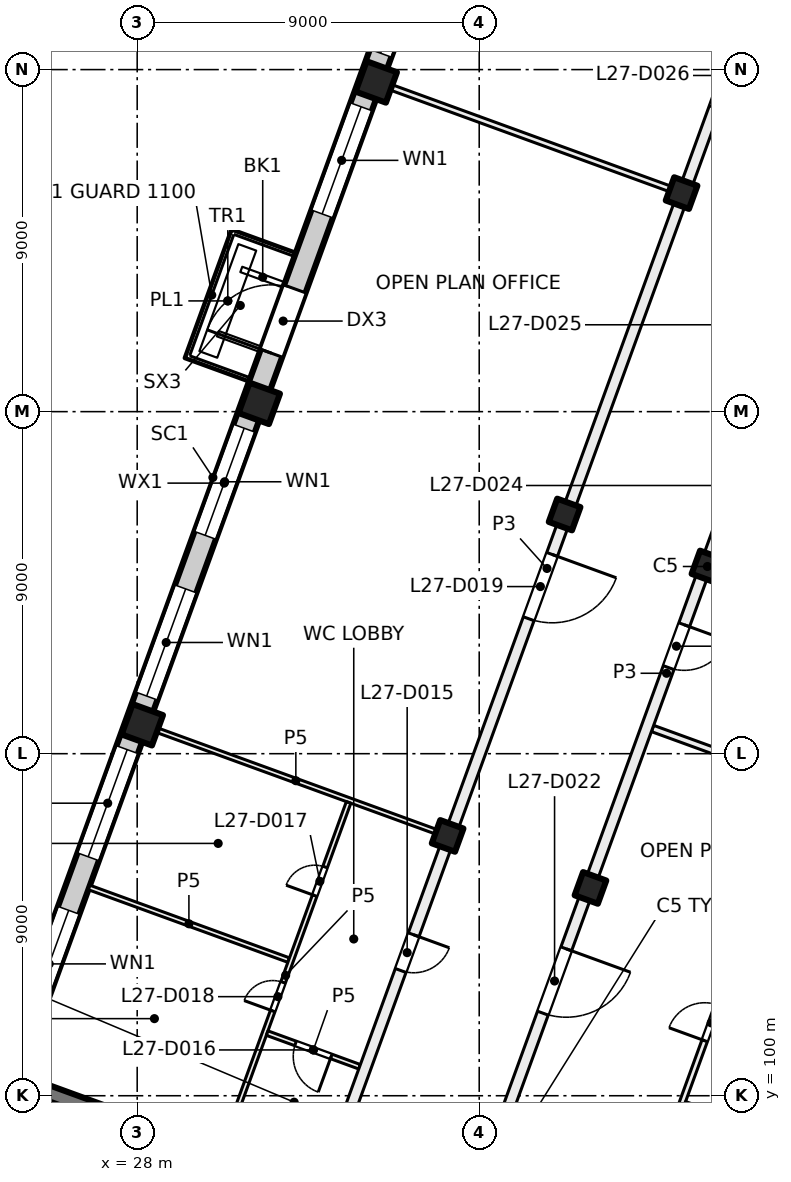
"""IFC4 building model, lengths in metres.
Left out: names, types, materials, properties, quantities, classifications, styles, units other than length and angle.
Written with IfcOpenShell. Run it as: python <this file> out.ifc"""

import sys

from ifc_helpers import new_model, si_unit, direction, frame, frame_2d, origin, origin_2d, place, context, subcontext, project, spatial, rectangle, extrude, element, fill, save


model = new_model("IFC4")
c1 = context("Model", 3, precision=1e-05, world=origin(), true_north=direction((0.0, 1.0)))
c2 = subcontext(c1, "Body", "Model", "MODEL_VIEW")
j1 = project(units=[si_unit("LENGTHUNIT", "METRE"), si_unit("PLANEANGLEUNIT", "RADIAN")], contexts=[c1])
p1 = place(None, origin())
s1 = spatial("IfcSite", under=j1, at=p1, CompositionType="ELEMENT")
p2 = place(p1, origin())
s2 = spatial("IfcBuilding", under=s1, at=p2, CompositionType="ELEMENT")
p3 = place(p2, frame((0.0, 0.0, 117.0)))
s3 = spatial("IfcBuildingStorey", under=s2, at=p3, CompositionType="ELEMENT", Elevation=117.0)
for number, where, z_axis, x_axis in (
    (1, (43.006, 113.925, 0.0), (0.0, 0.0, 1.0), (-0.342, -0.94, 0.0)),
    (2, (39.927, 105.468, 0.0), (0.0, 0.0, 1.0), (-0.342, -0.94, 0.0)),
    (3, (42.325, 123.751, 0.0), (0.0, 0.0, 1.0), (-0.342, -0.94, 0.0)),
    (4, (39.247, 115.293, 0.0), (0.0, 0.0, 1.0), (-0.342, -0.94, 0.0)),
    (5, (36.169, 106.836, 0.0), (0.0, 0.0, 1.0), (-0.342, -0.94, 0.0)),
):
    element("IfcColumn", number, at=place(p3, frame(where, z_axis=z_axis, x_axis=x_axis)), inside=s3, PredefinedType="COLUMN", context=c2, shape_type="SweptSolid", body=[
        extrude(rectangle(XDim=0.65, YDim=0.65, at=origin_2d()), origin(), (0.0, 0.0, 1.0), 4.0),
    ])
for number, where, z_axis, x_axis in (
    (6, (34.291, 126.675, 0.0), (0.0, 0.0, 1.0), (-0.342, -0.94, 0.0)),
    (7, (31.212, 118.218, 0.0), (0.0, 0.0, 1.0), (-0.342, -0.94, 0.0)),
    (8, (28.134, 109.76, 0.0), (0.0, 0.0, 1.0), (-0.342, -0.94, 0.0)),
):
    element("IfcColumn", number, at=place(p3, frame(where, z_axis=z_axis, x_axis=x_axis)), inside=s3, PredefinedType="COLUMN", context=c2, shape_type="SweptSolid", body=[
        extrude(rectangle(XDim=0.85, YDim=0.85, at=origin_2d()), origin(), (0.0, 0.0, 1.0), 4.0),
    ])
p4 = place(p3, frame((32.953, 97.418, 0.0), z_axis=(0.0, 0.0, 1.0), x_axis=(-0.93969060187, 0.342025690201, 0.0)))
e9 = element("IfcWall", 9, at=p4, inside=s3, PredefinedType="SHEAR", context=c2, shape_type="SweptSolid", body=[
    extrude(rectangle(XDim=8.6, YDim=0.4, at=frame_2d((4.3, 0.0))), origin(), (0.0, 0.0, 1.0), 4.0),
])
p5 = place(p3, frame((24.666, 100.669, 0.0), z_axis=(0.0, 0.0, 1.0), x_axis=(0.34201964167, 0.939692803373, 0.0)))
e10 = element("IfcWall", 10, at=p5, inside=s3, PredefinedType="SOLIDWALL", context=c2, shape_type="SweptSolid", body=[
    extrude(rectangle(XDim=32.884, YDim=0.6, at=frame_2d((16.442, 0.0))), origin(), (0.0, 0.0, 1.0), 3.625),
])
p6 = place(p5, frame((1.48, 0.0, 0.9)))
e11 = element("IfcOpeningElement", 11, at=p6, cuts=e10, PredefinedType="OPENING", context=c2, shape_type="SweptSolid", body=[
    extrude(rectangle(XDim=3.0, YDim=2.4, at=frame_2d((1.5, 1.2))), frame((0.0, 0.31, 0.0), z_axis=(0.0, -1.0, 0.0), x_axis=(1.0, 0.0, 0.0)), (0.0, 0.0, 1.0), 0.62),
])
p7 = place(p5, frame((5.98, 0.0, 0.9)))
e12 = element("IfcOpeningElement", 12, at=p7, cuts=e10, PredefinedType="OPENING", context=c2, shape_type="SweptSolid", body=[
    extrude(rectangle(XDim=3.0, YDim=2.4, at=frame_2d((1.5, 1.2))), frame((0.0, 0.31, 0.0), z_axis=(0.0, -1.0, 0.0), x_axis=(1.0, 0.0, 0.0)), (0.0, 0.0, 1.0), 0.62),
])
p8 = place(p5, frame((10.48, 0.0, 0.9)))
e13 = element("IfcOpeningElement", 13, at=p8, cuts=e10, PredefinedType="OPENING", context=c2, shape_type="SweptSolid", body=[
    extrude(rectangle(XDim=3.0, YDim=2.4, at=frame_2d((1.5, 1.2))), frame((0.0, 0.31, 0.0), z_axis=(0.0, -1.0, 0.0), x_axis=(1.0, 0.0, 0.0)), (0.0, 0.0, 1.0), 0.62),
])
p9 = place(p5, frame((14.98, 0.0, 0.9)))
e14 = element("IfcOpeningElement", 14, at=p9, cuts=e10, PredefinedType="OPENING", context=c2, shape_type="SweptSolid", body=[
    extrude(rectangle(XDim=3.0, YDim=2.4, at=frame_2d((1.5, 1.2))), frame((0.0, 0.31, 0.0), z_axis=(0.0, -1.0, 0.0), x_axis=(1.0, 0.0, 0.0)), (0.0, 0.0, 1.0), 0.62),
])
p10 = place(p5, frame((20.08, 0.0, 0.0)))
e15 = element("IfcOpeningElement", 15, at=p10, cuts=e10, PredefinedType="OPENING", context=c2, shape_type="SweptSolid", body=[
    extrude(rectangle(XDim=1.8, YDim=2.4, at=frame_2d((0.9, 1.2))), frame((0.0, 0.31, 0.0), z_axis=(0.0, -1.0, 0.0), x_axis=(1.0, 0.0, 0.0)), (0.0, 0.0, 1.0), 0.62),
])
p11 = place(p5, frame((23.98, 0.0, 0.9)))
e16 = element("IfcOpeningElement", 16, at=p11, cuts=e10, PredefinedType="OPENING", context=c2, shape_type="SweptSolid", body=[
    extrude(rectangle(XDim=3.0, YDim=2.4, at=frame_2d((1.5, 1.2))), frame((0.0, 0.31, 0.0), z_axis=(0.0, -1.0, 0.0), x_axis=(1.0, 0.0, 0.0)), (0.0, 0.0, 1.0), 0.62),
])
p12 = place(p5, frame((28.48, 0.0, 0.9)))
e17 = element("IfcOpeningElement", 17, at=p12, cuts=e10, PredefinedType="OPENING", context=c2, shape_type="SweptSolid", body=[
    extrude(rectangle(XDim=3.0, YDim=2.4, at=frame_2d((1.5, 1.2))), frame((0.0, 0.31, 0.0), z_axis=(0.0, -1.0, 0.0), x_axis=(1.0, 0.0, 0.0)), (0.0, 0.0, 1.0), 0.62),
])
p13 = place(p3, frame((26.736, 105.48, 0.0), z_axis=(0.0, 0.0, 1.0), x_axis=(0.939690035435, -0.342027246436, 0.0)))
e18 = element("IfcWall", 18, at=p13, inside=s3, PredefinedType="PARTITIONING", context=c2, shape_type="SweptSolid", body=[
    extrude(rectangle(XDim=5.587, YDim=0.125, at=frame_2d((2.793, 0.0))), origin(), (0.0, 0.0, 1.0), 3.625),
])
p14 = place(p3, frame((28.275, 109.709, 0.0), z_axis=(0.0, 0.0, 1.0), x_axis=(0.939697205528, -0.342007546586, 0.0)))
e19 = element("IfcWall", 19, at=p14, inside=s3, PredefinedType="PARTITIONING", context=c2, shape_type="SweptSolid", body=[
    extrude(rectangle(XDim=8.301, YDim=0.125, at=frame_2d((4.15, 0.0))), origin(), (0.0, 0.0, 1.0), 3.625),
])
p15 = place(p3, frame((30.25, 98.615, 0.0), z_axis=(0.0, 0.0, 1.0), x_axis=(0.341998018937, 0.93970067311, 0.0)))
e20 = element("IfcWall", 20, at=p15, inside=s3, PredefinedType="PARTITIONING", context=c2, shape_type="SweptSolid", body=[
    extrude(rectangle(XDim=9.687, YDim=0.125, at=frame_2d((4.844, 0.0))), origin(), (0.0, 0.0, 1.0), 3.625),
])
p16 = place(p15, frame((7.078, 0.0, 0.0)))
e21 = element("IfcOpeningElement", 21, at=p16, cuts=e20, PredefinedType="OPENING", context=c2, shape_type="SweptSolid", body=[
    extrude(rectangle(XDim=0.8, YDim=2.1, at=frame_2d((0.4, 1.05))), frame((0.0, 0.073, 0.0), z_axis=(0.0, -1.0, 0.0), x_axis=(1.0, 0.0, 0.0)), (0.0, 0.0, 1.0), 0.145),
])
p17 = place(p15, frame((3.848, 0.0, 0.0)))
e22 = element("IfcOpeningElement", 22, at=p17, cuts=e20, PredefinedType="OPENING", context=c2, shape_type="SweptSolid", body=[
    extrude(rectangle(XDim=0.8, YDim=2.1, at=frame_2d((0.4, 1.05))), frame((0.0, 0.073, 0.0), z_axis=(0.0, -1.0, 0.0), x_axis=(1.0, 0.0, 0.0)), (0.0, 0.0, 1.0), 0.145),
])
p18 = place(p3, frame((33.852, 100.762, 0.0), z_axis=(0.0, 0.0, 1.0), x_axis=(-0.93959774877, 0.342280689649, 0.0)))
e23 = element("IfcWall", 23, at=p18, inside=s3, PredefinedType="PARTITIONING", context=c2, shape_type="SweptSolid", body=[
    extrude(rectangle(XDim=2.588, YDim=0.125, at=frame_2d((1.294, 0.0))), origin(), (0.0, 0.0, 1.0), 3.625),
])
p19 = place(p18, frame((0.794, 0.0, 0.0)))
e24 = element("IfcOpeningElement", 24, at=p19, cuts=e23, PredefinedType="OPENING", context=c2, shape_type="SweptSolid", body=[
    extrude(rectangle(XDim=1.0, YDim=2.1, at=frame_2d((0.5, 1.05))), frame((0.0, 0.073, 0.0), z_axis=(0.0, -1.0, 0.0), x_axis=(1.0, 0.0, 0.0)), (0.0, 0.0, 1.0), 0.145),
])
p20 = place(p3, frame((44.686, 130.091, 0.0), z_axis=(0.0, 0.0, 1.0), x_axis=(-0.342017360004, -0.939693633828, 0.0)))
e25 = element("IfcWall", 25, at=p20, inside=s3, PredefinedType="PARTITIONING", context=c2, shape_type="SweptSolid", body=[
    extrude(rectangle(XDim=34.516, YDim=0.3, at=frame_2d((17.258, 0.0))), origin(), (0.0, 0.0, 1.0), 3.625),
])
p21 = place(p20, frame((27.515, 0.0, 0.0)))
e26 = element("IfcOpeningElement", 26, at=p21, cuts=e25, PredefinedType="OPENING", context=c2, shape_type="SweptSolid", body=[
    extrude(rectangle(XDim=1.0, YDim=2.1, at=frame_2d((0.5, 1.05))), frame((0.0, 0.16, 0.0), z_axis=(0.0, -1.0, 0.0), x_axis=(1.0, 0.0, 0.0)), (0.0, 0.0, 1.0), 0.32),
])
p22 = place(p20, frame((16.865, 0.0, 0.0)))
e27 = element("IfcOpeningElement", 27, at=p22, cuts=e25, PredefinedType="OPENING", context=c2, shape_type="SweptSolid", body=[
    extrude(rectangle(XDim=1.8, YDim=2.1, at=frame_2d((0.9, 1.05))), frame((0.0, 0.16, 0.0), z_axis=(0.0, -1.0, 0.0), x_axis=(1.0, 0.0, 0.0)), (0.0, 0.0, 1.0), 0.32),
])
p23 = place(p20, frame((2.554, 0.0, 0.0)))
e28 = element("IfcOpeningElement", 28, at=p23, cuts=e25, PredefinedType="OPENING", context=c2, shape_type="SweptSolid", body=[
    extrude(rectangle(XDim=1.8, YDim=2.1, at=frame_2d((0.9, 1.05))), frame((0.0, 0.16, 0.0), z_axis=(0.0, -1.0, 0.0), x_axis=(1.0, 0.0, 0.0)), (0.0, 0.0, 1.0), 0.32),
])
p24 = place(p3, frame((40.539, 94.87, 0.0), z_axis=(0.0, 0.0, 1.0), x_axis=(0.342082231415, 0.939670020247, 0.0)))
e29 = element("IfcWall", 29, at=p24, inside=s3, PredefinedType="PARTITIONING", context=c2, shape_type="SweptSolid", body=[
    extrude(rectangle(XDim=9.825, YDim=0.15, at=frame_2d((4.912, 0.0))), origin(), (0.0, 0.0, 1.0), 3.625),
])
p25 = place(p24, frame((2.125, 0.0, 0.0)))
e30 = element("IfcOpeningElement", 30, at=p25, cuts=e29, PredefinedType="OPENING", context=c2, shape_type="SweptSolid", body=[
    extrude(rectangle(XDim=1.0, YDim=2.1, at=frame_2d((0.5, 1.05))), frame((0.0, 0.085, 0.0), z_axis=(0.0, -1.0, 0.0), x_axis=(1.0, 0.0, 0.0)), (0.0, 0.0, 1.0), 0.17),
])
p26 = place(p24, frame((7.0, 0.0, 0.0)))
e31 = element("IfcOpeningElement", 31, at=p26, cuts=e29, PredefinedType="OPENING", context=c2, shape_type="SweptSolid", body=[
    extrude(rectangle(XDim=1.0, YDim=2.1, at=frame_2d((0.5, 1.05))), frame((0.0, 0.085, 0.0), z_axis=(0.0, -1.0, 0.0), x_axis=(1.0, 0.0, 0.0)), (0.0, 0.0, 1.0), 0.17),
])
p27 = place(p3, frame((41.561, 109.663, 0.0), z_axis=(0.0, 0.0, 1.0), x_axis=(0.939673986983, -0.342071334939, 0.0)))
e32 = element("IfcWall", 32, at=p27, inside=s3, PredefinedType="PARTITIONING", context=c2, shape_type="SweptSolid", body=[
    extrude(rectangle(XDim=8.3, YDim=0.175, at=frame_2d((4.15, 0.0))), origin(), (0.0, 0.0, 1.0), 3.625),
])
p28 = place(p3, frame((42.405, 99.777, 0.0), z_axis=(0.0, 0.0, 1.0), x_axis=(0.939765774653, -0.341819087808, 0.0)))
e33 = element("IfcWall", 33, at=p28, inside=s3, PredefinedType="PARTITIONING", context=c2, shape_type="SweptSolid", body=[
    extrude(rectangle(XDim=4.125, YDim=0.15, at=frame_2d((2.063, 0.0))), origin(), (0.0, 0.0, 1.0), 3.625),
])
p29 = place(p3, frame((42.231, 123.785, 0.0), z_axis=(0.0, 0.0, 1.0), x_axis=(-0.939687752599, 0.342033518263, 0.0)))
e34 = element("IfcWall", 34, at=p29, inside=s3, PredefinedType="PARTITIONING", context=c2, shape_type="SweptSolid", body=[
    extrude(rectangle(XDim=8.301, YDim=0.15, at=frame_2d((4.15, 0.0))), origin(), (0.0, 0.0, 1.0), 3.625),
])
p30 = place(p3, frame((43.1, 113.891, 0.0), z_axis=(0.0, 0.0, 1.0), x_axis=(0.939670544866, -0.342080790328, 0.0)))
e35 = element("IfcWall", 35, at=p30, inside=s3, PredefinedType="PARTITIONING", context=c2, shape_type="SweptSolid", body=[
    extrude(rectangle(XDim=8.3, YDim=0.175, at=frame_2d((4.15, 0.0))), origin(), (0.0, 0.0, 1.0), 3.625),
])
p31 = place(p3, frame((47.314, 125.909, 0.0), z_axis=(0.0, 0.0, 1.0), x_axis=(-0.342010770371, -0.939696032209, 0.0)))
e36 = element("IfcWall", 36, at=p31, inside=s3, PredefinedType="PARTITIONING", context=c2, shape_type="SweptSolid", body=[
    extrude(rectangle(XDim=31.485, YDim=0.3, at=frame_2d((15.742, 0.0))), origin(), (0.0, 0.0, 1.0), 3.625),
])
p32 = place(p31, frame((23.459, 0.0, 0.0)))
e37 = element("IfcOpeningElement", 37, at=p32, cuts=e36, PredefinedType="OPENING", context=c2, shape_type="SweptSolid", body=[
    extrude(rectangle(XDim=1.8, YDim=2.1, at=frame_2d((0.9, 1.05))), frame((0.0, 0.16, 0.0), z_axis=(0.0, -1.0, 0.0), x_axis=(1.0, 0.0, 0.0)), (0.0, 0.0, 1.0), 0.32),
])
p33 = place(p31, frame((14.385, 0.0, 0.0)))
e38 = element("IfcOpeningElement", 38, at=p33, cuts=e36, PredefinedType="OPENING", context=c2, shape_type="SweptSolid", body=[
    extrude(rectangle(XDim=1.2, YDim=2.1, at=frame_2d((0.6, 1.05))), frame((0.0, 0.16, 0.0), z_axis=(0.0, -1.0, 0.0), x_axis=(1.0, 0.0, 0.0)), (0.0, 0.0, 1.0), 0.32),
])
p34 = place(p31, frame((9.885, 0.0, 0.0)))
e39 = element("IfcOpeningElement", 39, at=p34, cuts=e36, PredefinedType="OPENING", context=c2, shape_type="SweptSolid", body=[
    extrude(rectangle(XDim=1.2, YDim=2.1, at=frame_2d((0.6, 1.05))), frame((0.0, 0.16, 0.0), z_axis=(0.0, -1.0, 0.0), x_axis=(1.0, 0.0, 0.0)), (0.0, 0.0, 1.0), 0.32),
])
p35 = place(p31, frame((5.384, 0.0, 0.0)))
e40 = element("IfcOpeningElement", 40, at=p35, cuts=e36, PredefinedType="OPENING", context=c2, shape_type="SweptSolid", body=[
    extrude(rectangle(XDim=1.2, YDim=2.1, at=frame_2d((0.6, 1.05))), frame((0.0, 0.16, 0.0), z_axis=(0.0, -1.0, 0.0), x_axis=(1.0, 0.0, 0.0)), (0.0, 0.0, 1.0), 0.32),
])
p36 = place(p6, origin())
e41 = element("IfcWindow", 41, at=p36, inside=s3, PartitioningType="SINGLE_PANEL", PredefinedType="WINDOW", context=c2, shape_type="SweptSolid", body=[
    extrude(rectangle(XDim=3.0, YDim=2.4, at=frame_2d((1.5, 1.2))), frame((0.0, 0.03, 0.0), z_axis=(0.0, -1.0, 0.0), x_axis=(1.0, 0.0, 0.0)), (0.0, 0.0, 1.0), 0.06),
])
fill(e11, e41)
p37 = place(p7, origin())
e42 = element("IfcWindow", 42, at=p37, inside=s3, PartitioningType="SINGLE_PANEL", PredefinedType="WINDOW", context=c2, shape_type="SweptSolid", body=[
    extrude(rectangle(XDim=3.0, YDim=2.4, at=frame_2d((1.5, 1.2))), frame((0.0, 0.03, 0.0), z_axis=(0.0, -1.0, 0.0), x_axis=(1.0, 0.0, 0.0)), (0.0, 0.0, 1.0), 0.06),
])
fill(e12, e42)
p38 = place(p8, origin())
e43 = element("IfcWindow", 43, at=p38, inside=s3, PartitioningType="SINGLE_PANEL", PredefinedType="WINDOW", context=c2, shape_type="SweptSolid", body=[
    extrude(rectangle(XDim=3.0, YDim=2.4, at=frame_2d((1.5, 1.2))), frame((0.0, 0.03, 0.0), z_axis=(0.0, -1.0, 0.0), x_axis=(1.0, 0.0, 0.0)), (0.0, 0.0, 1.0), 0.06),
])
fill(e13, e43)
p39 = place(p9, origin())
e44 = element("IfcWindow", 44, at=p39, inside=s3, PartitioningType="SINGLE_PANEL", PredefinedType="WINDOW", context=c2, shape_type="SweptSolid", body=[
    extrude(rectangle(XDim=3.0, YDim=2.4, at=frame_2d((1.5, 1.2))), frame((0.0, 0.03, 0.0), z_axis=(0.0, -1.0, 0.0), x_axis=(1.0, 0.0, 0.0)), (0.0, 0.0, 1.0), 0.06),
])
fill(e14, e44)
p40 = place(p10, origin())
e45 = element("IfcDoor", 45, at=p40, inside=s3, OperationType="DOUBLE_DOOR_SINGLE_SWING", PredefinedType="DOOR", context=c2, shape_type="SweptSolid", body=[
    extrude(rectangle(XDim=1.8, YDim=2.4, at=frame_2d((0.9, 1.2))), frame((0.0, 0.025, 0.0), z_axis=(0.0, -1.0, 0.0), x_axis=(1.0, 0.0, 0.0)), (0.0, 0.0, 1.0), 0.05),
])
fill(e15, e45)
p41 = place(p11, origin())
e46 = element("IfcWindow", 46, at=p41, inside=s3, PartitioningType="SINGLE_PANEL", PredefinedType="WINDOW", context=c2, shape_type="SweptSolid", body=[
    extrude(rectangle(XDim=3.0, YDim=2.4, at=frame_2d((1.5, 1.2))), frame((0.0, 0.03, 0.0), z_axis=(0.0, -1.0, 0.0), x_axis=(1.0, 0.0, 0.0)), (0.0, 0.0, 1.0), 0.06),
])
fill(e16, e46)
p42 = place(p12, origin())
e47 = element("IfcWindow", 47, at=p42, inside=s3, PartitioningType="SINGLE_PANEL", PredefinedType="WINDOW", context=c2, shape_type="SweptSolid", body=[
    extrude(rectangle(XDim=3.0, YDim=2.4, at=frame_2d((1.5, 1.2))), frame((0.0, 0.03, 0.0), z_axis=(0.0, -1.0, 0.0), x_axis=(1.0, 0.0, 0.0)), (0.0, 0.0, 1.0), 0.06),
])
fill(e17, e47)
p43 = place(p21, origin())
e48 = element("IfcDoor", 48, at=p43, inside=s3, OperationType="SINGLE_SWING_RIGHT", PredefinedType="DOOR", context=c2, shape_type="SweptSolid", body=[
    extrude(rectangle(XDim=1.0, YDim=2.1, at=frame_2d((0.5, 1.05))), frame((0.0, 0.025, 0.0), z_axis=(0.0, -1.0, 0.0), x_axis=(1.0, 0.0, 0.0)), (0.0, 0.0, 1.0), 0.05),
])
fill(e26, e48)
p44 = place(p19, origin())
e49 = element("IfcDoor", 49, at=p44, inside=s3, OperationType="SINGLE_SWING_RIGHT", PredefinedType="DOOR", context=c2, shape_type="SweptSolid", body=[
    extrude(rectangle(XDim=1.0, YDim=2.1, at=frame_2d((0.5, 1.05))), frame((0.0, 0.025, 0.0), z_axis=(0.0, -1.0, 0.0), x_axis=(1.0, 0.0, 0.0)), (0.0, 0.0, 1.0), 0.05),
])
fill(e24, e49)
p45 = place(p16, origin())
e50 = element("IfcDoor", 50, at=p45, inside=s3, OperationType="SINGLE_SWING_RIGHT", PredefinedType="DOOR", context=c2, shape_type="SweptSolid", body=[
    extrude(rectangle(XDim=0.8, YDim=2.1, at=frame_2d((0.4, 1.05))), frame((0.0, 0.025, 0.0), z_axis=(0.0, -1.0, 0.0), x_axis=(1.0, 0.0, 0.0)), (0.0, 0.0, 1.0), 0.05),
])
fill(e21, e50)
p46 = place(p17, origin())
e51 = element("IfcDoor", 51, at=p46, inside=s3, OperationType="SINGLE_SWING_RIGHT", PredefinedType="DOOR", context=c2, shape_type="SweptSolid", body=[
    extrude(rectangle(XDim=0.8, YDim=2.1, at=frame_2d((0.4, 1.05))), frame((0.0, 0.025, 0.0), z_axis=(0.0, -1.0, 0.0), x_axis=(1.0, 0.0, 0.0)), (0.0, 0.0, 1.0), 0.05),
])
fill(e22, e51)
p47 = place(p22, origin())
e52 = element("IfcDoor", 52, at=p47, inside=s3, OperationType="DOUBLE_DOOR_SINGLE_SWING", PredefinedType="DOOR", context=c2, shape_type="SweptSolid", body=[
    extrude(rectangle(XDim=1.8, YDim=2.1, at=frame_2d((0.9, 1.05))), frame((0.0, 0.025, 0.0), z_axis=(0.0, -1.0, 0.0), x_axis=(1.0, 0.0, 0.0)), (0.0, 0.0, 1.0), 0.05),
])
fill(e27, e52)
p48 = place(p26, origin())
e53 = element("IfcDoor", 53, at=p48, inside=s3, OperationType="SINGLE_SWING_LEFT", PredefinedType="DOOR", context=c2, shape_type="SweptSolid", body=[
    extrude(rectangle(XDim=1.0, YDim=2.1, at=frame_2d((0.5, 1.05))), frame((0.0, 0.025, 0.0), z_axis=(0.0, -1.0, 0.0), x_axis=(1.0, 0.0, 0.0)), (0.0, 0.0, 1.0), 0.05),
])
fill(e31, e53)
p49 = place(p32, origin())
e54 = element("IfcDoor", 54, at=p49, inside=s3, OperationType="DOUBLE_DOOR_SINGLE_SWING", PredefinedType="DOOR", context=c2, shape_type="SweptSolid", body=[
    extrude(rectangle(XDim=1.8, YDim=2.1, at=frame_2d((0.9, 1.05))), frame((0.0, 0.025, 0.0), z_axis=(0.0, -1.0, 0.0), x_axis=(1.0, 0.0, 0.0)), (0.0, 0.0, 1.0), 0.05),
])
fill(e37, e54)
p50 = place(p33, origin())
e55 = element("IfcDoor", 55, at=p50, inside=s3, OperationType="DOUBLE_DOOR_SINGLE_SWING", PredefinedType="DOOR", context=c2, shape_type="SweptSolid", body=[
    extrude(rectangle(XDim=1.2, YDim=2.1, at=frame_2d((0.6, 1.05))), frame((0.0, 0.025, 0.0), z_axis=(0.0, -1.0, 0.0), x_axis=(1.0, 0.0, 0.0)), (0.0, 0.0, 1.0), 0.05),
])
fill(e38, e55)
save(model, sys.argv[1])
